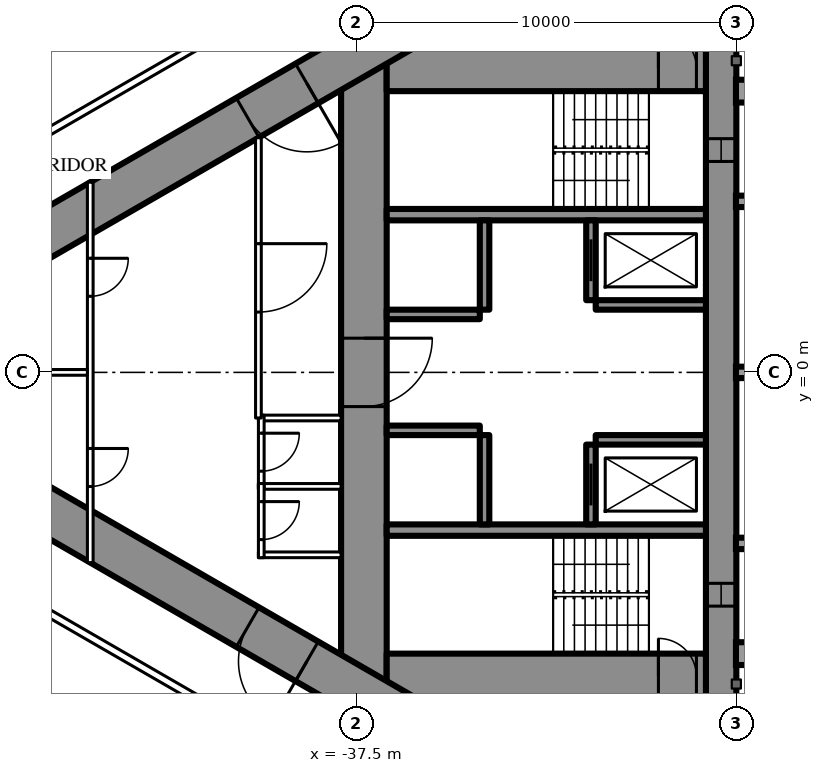
"""IFC4 building model, lengths in metres.
Left out: names, types, materials, properties, quantities, classifications, styles, units other than length and angle.
Written with IfcOpenShell. Run it as: python <this file> out.ifc"""

import sys

from ifc_helpers import new_model, si_unit, direction, frame, frame_2d, origin, place, context, subcontext, project, spatial, rectangle, extrude, element, fill, save


model = new_model("IFC4")
c1 = context("Model", 3, precision=1e-05, world=origin(), true_north=direction((0.0, 1.0)))
c2 = subcontext(c1, "Body", "Model", "MODEL_VIEW")
j1 = project(units=[si_unit("LENGTHUNIT", "METRE"), si_unit("PLANEANGLEUNIT", "RADIAN")], contexts=[c1])
p1 = place(None, origin())
s1 = spatial("IfcSite", under=j1, at=p1, CompositionType="ELEMENT")
p2 = place(p1, origin())
s2 = spatial("IfcBuilding", under=s1, at=p2, CompositionType="ELEMENT")
p3 = place(p2, frame((0.0, 0.0, 115.1)))
s3 = spatial("IfcBuildingStorey", under=s2, at=p3, CompositionType="ELEMENT", Elevation=115.1)
p4 = place(p3, frame((-27.9, 8.6, 0.0), z_axis=(0.0, 0.0, 1.0), x_axis=(0.0, -1.0, 0.0)))
e1 = element("IfcWall", 1, at=p4, inside=s3, PredefinedType="SHEAR", context=c2, shape_type="SweptSolid", body=[
    extrude(rectangle(XDim=17.2, YDim=0.8, at=frame_2d((8.6, 0.0))), origin(), (0.0, 0.0, 1.0), 3.5),
])
p5 = place(p4, frame((2.45, 0.0, 0.6)))
e2 = element("IfcOpeningElement", 2, at=p5, cuts=e1, PredefinedType="OPENING", context=c2, shape_type="SweptSolid", body=[
    extrude(rectangle(XDim=0.6, YDim=2.1, at=frame_2d((0.3, 1.05))), frame((0.0, 0.41, 0.0), z_axis=(0.0, -1.0, 0.0), x_axis=(1.0, 0.0, 0.0)), (0.0, 0.0, 1.0), 0.82),
])
p6 = place(p4, frame((14.15, 0.0, 0.6)))
e3 = element("IfcOpeningElement", 3, at=p6, cuts=e1, PredefinedType="OPENING", context=c2, shape_type="SweptSolid", body=[
    extrude(rectangle(XDim=0.6, YDim=2.1, at=frame_2d((0.3, 1.05))), frame((0.0, 0.41, 0.0), z_axis=(0.0, -1.0, 0.0), x_axis=(1.0, 0.0, 0.0)), (0.0, 0.0, 1.0), 0.82),
])
p7 = place(p3, frame((-37.3, 8.6, 0.0), z_axis=(0.0, 0.0, 1.0), x_axis=(0.0, -1.0, 0.0)))
e4 = element("IfcWall", 4, at=p7, inside=s3, PredefinedType="SHEAR", context=c2, shape_type="SweptSolid", body=[
    extrude(rectangle(XDim=17.2, YDim=1.2, at=frame_2d((8.6, 0.0))), origin(), (0.0, 0.0, 1.0), 3.5),
])
p8 = place(p7, frame((7.7, 0.0, 0.0)))
e5 = element("IfcOpeningElement", 5, at=p8, cuts=e4, PredefinedType="OPENING", context=c2, shape_type="SweptSolid", body=[
    extrude(rectangle(XDim=1.8, YDim=2.2, at=frame_2d((0.9, 1.1))), frame((0.0, 0.61, 0.0), z_axis=(0.0, -1.0, 0.0), x_axis=(1.0, 0.0, 0.0)), (0.0, 0.0, 1.0), 1.22),
])
p9 = place(p3, frame((-28.3, 8.0, 0.0), z_axis=(0.0, 0.0, 1.0), x_axis=(-1.0, 0.0, 0.0)))
e6 = element("IfcWall", 6, at=p9, inside=s3, PredefinedType="SHEAR", context=c2, shape_type="SweptSolid", body=[
    extrude(rectangle(XDim=8.4, YDim=1.2, at=frame_2d((4.2, 0.0))), origin(), (0.0, 0.0, 1.0), 3.5),
])
p10 = place(p9, frame((0.25, 0.0, 0.0)))
e7 = element("IfcOpeningElement", 7, at=p10, cuts=e6, PredefinedType="OPENING", context=c2, shape_type="SweptSolid", body=[
    extrude(rectangle(XDim=1.0, YDim=2.2, at=frame_2d((0.5, 1.1))), frame((0.0, 0.61, 0.0), z_axis=(0.0, -1.0, 0.0), x_axis=(1.0, 0.0, 0.0)), (0.0, 0.0, 1.0), 1.22),
])
p11 = place(p3, frame((-28.3, -8.0, 0.0), z_axis=(0.0, 0.0, 1.0), x_axis=(-1.0, 0.0, 0.0)))
e8 = element("IfcWall", 8, at=p11, inside=s3, PredefinedType="SHEAR", context=c2, shape_type="SweptSolid", body=[
    extrude(rectangle(XDim=8.4, YDim=1.2, at=frame_2d((4.2, 0.0))), origin(), (0.0, 0.0, 1.0), 3.5),
])
p12 = place(p11, frame((0.25, 0.0, 0.0)))
e9 = element("IfcOpeningElement", 9, at=p12, cuts=e8, PredefinedType="OPENING", context=c2, shape_type="SweptSolid", body=[
    extrude(rectangle(XDim=1.0, YDim=2.2, at=frame_2d((0.5, 1.1))), frame((0.0, 0.61, 0.0), z_axis=(0.0, -1.0, 0.0), x_axis=(1.0, 0.0, 0.0)), (0.0, 0.0, 1.0), 1.22),
])
for number, where, z_axis, x_axis in (
    (10, (-28.3, 4.15, 0.0), (0.0, 0.0, 1.0), (-1.0, 0.0, 0.0)),
    (11, (-28.3, -4.15, 0.0), (0.0, 0.0, 1.0), (-1.0, 0.0, 0.0)),
):
    element("IfcWall", number, at=place(p3, frame(where, z_axis=z_axis, x_axis=x_axis)), inside=s3, PredefinedType="SHEAR", context=c2, shape_type="SweptSolid", body=[
        extrude(rectangle(XDim=8.4, YDim=0.3, at=frame_2d((4.2, 0.0))), origin(), (0.0, 0.0, 1.0), 3.5),
    ])
p13 = place(p3, frame((-31.325, 4.0, 0.0), z_axis=(0.0, 0.0, 1.0), x_axis=(0.0, -1.0, 0.0)))
e12 = element("IfcWall", 12, at=p13, inside=s3, PredefinedType="SHEAR", context=c2, shape_type="SweptSolid", body=[
    extrude(rectangle(XDim=2.1, YDim=0.25, at=frame_2d((1.05, 0.0))), origin(), (0.0, 0.0, 1.0), 3.5),
])
p14 = place(p13, frame((0.5, 0.0, 0.0)))
e13 = element("IfcOpeningElement", 13, at=p14, cuts=e12, PredefinedType="OPENING", context=c2, shape_type="SweptSolid", body=[
    extrude(rectangle(XDim=1.1, YDim=2.2, at=frame_2d((0.55, 1.1))), frame((0.0, 0.135, 0.0), z_axis=(0.0, -1.0, 0.0), x_axis=(1.0, 0.0, 0.0)), (0.0, 0.0, 1.0), 0.27),
])
p15 = place(p3, frame((-34.125, 4.0, 0.0), z_axis=(0.0, 0.0, 1.0), x_axis=(0.0, -1.0, 0.0)))
e14 = element("IfcWall", 14, at=p15, inside=s3, PredefinedType="SHEAR", context=c2, shape_type="SweptSolid", body=[
    extrude(rectangle(XDim=2.35, YDim=0.25, at=frame_2d((1.175, 0.0))), origin(), (0.0, 0.0, 1.0), 3.5),
])
p16 = place(p3, frame((-28.3, 1.775, 0.0), z_axis=(0.0, 0.0, 1.0), x_axis=(-1.0, 0.0, 0.0)))
e15 = element("IfcWall", 15, at=p16, inside=s3, PredefinedType="SHEAR", context=c2, shape_type="SweptSolid", body=[
    extrude(rectangle(XDim=2.9, YDim=0.25, at=frame_2d((1.45, 0.0))), origin(), (0.0, 0.0, 1.0), 3.5),
])
p17 = place(p3, frame((-34.25, 1.525, 0.0), z_axis=(0.0, 0.0, 1.0), x_axis=(-1.0, 0.0, 0.0)))
e16 = element("IfcWall", 16, at=p17, inside=s3, PredefinedType="SHEAR", context=c2, shape_type="SweptSolid", body=[
    extrude(rectangle(XDim=2.45, YDim=0.25, at=frame_2d((1.225, 0.0))), origin(), (0.0, 0.0, 1.0), 3.5),
])
p18 = place(p3, frame((-31.325, -1.9, 0.0), z_axis=(0.0, 0.0, 1.0), x_axis=(0.0, -1.0, 0.0)))
e17 = element("IfcWall", 17, at=p18, inside=s3, PredefinedType="SHEAR", context=c2, shape_type="SweptSolid", body=[
    extrude(rectangle(XDim=2.1, YDim=0.25, at=frame_2d((1.05, 0.0))), origin(), (0.0, 0.0, 1.0), 3.5),
])
p19 = place(p18, frame((0.5, 0.0, 0.0)))
e18 = element("IfcOpeningElement", 18, at=p19, cuts=e17, PredefinedType="OPENING", context=c2, shape_type="SweptSolid", body=[
    extrude(rectangle(XDim=1.1, YDim=2.2, at=frame_2d((0.55, 1.1))), frame((0.0, 0.135, 0.0), z_axis=(0.0, -1.0, 0.0), x_axis=(1.0, 0.0, 0.0)), (0.0, 0.0, 1.0), 0.27),
])
p20 = place(p3, frame((-34.125, -1.65, 0.0), z_axis=(0.0, 0.0, 1.0), x_axis=(0.0, -1.0, 0.0)))
e19 = element("IfcWall", 19, at=p20, inside=s3, PredefinedType="SHEAR", context=c2, shape_type="SweptSolid", body=[
    extrude(rectangle(XDim=2.35, YDim=0.25, at=frame_2d((1.175, 0.0))), origin(), (0.0, 0.0, 1.0), 3.5),
])
p21 = place(p3, frame((-28.3, -1.775, 0.0), z_axis=(0.0, 0.0, 1.0), x_axis=(-1.0, 0.0, 0.0)))
e20 = element("IfcWall", 20, at=p21, inside=s3, PredefinedType="SHEAR", context=c2, shape_type="SweptSolid", body=[
    extrude(rectangle(XDim=2.9, YDim=0.25, at=frame_2d((1.45, 0.0))), origin(), (0.0, 0.0, 1.0), 3.5),
])
p22 = place(p3, frame((-34.25, -1.525, 0.0), z_axis=(0.0, 0.0, 1.0), x_axis=(-1.0, 0.0, 0.0)))
e21 = element("IfcWall", 21, at=p22, inside=s3, PredefinedType="SHEAR", context=c2, shape_type="SweptSolid", body=[
    extrude(rectangle(XDim=2.45, YDim=0.25, at=frame_2d((1.225, 0.0))), origin(), (0.0, 0.0, 1.0), 3.5),
])
p23 = place(p3, frame((-27.2, 14.3, 0.0), z_axis=(0.0, 0.0, 1.0), x_axis=(-0.866026593062, -0.499997940104, 0.0)))
e22 = element("IfcWall", 22, at=p23, inside=s3, PredefinedType="SHEAR", context=c2, shape_type="SweptSolid", body=[
    extrude(rectangle(XDim=28.946, YDim=1.2, at=frame_2d((14.473, 0.0))), origin(), (0.0, 0.0, 1.0), 3.5),
])
p24 = place(p23, frame((4.6, 0.0, 0.0)))
e23 = element("IfcOpeningElement", 23, at=p24, cuts=e22, PredefinedType="OPENING", context=c2, shape_type="SweptSolid", body=[
    extrude(rectangle(XDim=1.0, YDim=2.2, at=frame_2d((0.5, 1.1))), frame((0.0, 0.61, 0.0), z_axis=(0.0, -1.0, 0.0), x_axis=(1.0, 0.0, 0.0)), (0.0, 0.0, 1.0), 1.22),
])
p25 = place(p23, frame((13.395, 0.0, 0.0)))
e24 = element("IfcOpeningElement", 24, at=p25, cuts=e22, PredefinedType="OPENING", context=c2, shape_type="SweptSolid", body=[
    extrude(rectangle(XDim=1.8, YDim=2.2, at=frame_2d((0.9, 1.1))), frame((0.0, 0.61, 0.0), z_axis=(0.0, -1.0, 0.0), x_axis=(1.0, 0.0, 0.0)), (0.0, 0.0, 1.0), 1.22),
])
p26 = place(p3, frame((-27.2, -14.3, 0.0), z_axis=(0.0, 0.0, 1.0), x_axis=(-0.866024021859, 0.500002393557, 0.0)))
e25 = element("IfcWall", 25, at=p26, inside=s3, PredefinedType="SHEAR", context=c2, shape_type="SweptSolid", body=[
    extrude(rectangle(XDim=27.907, YDim=1.2, at=frame_2d((13.954, 0.0))), origin(), (0.0, 0.0, 1.0), 3.5),
])
p27 = place(p26, frame((4.6, 0.0, 0.0)))
e26 = element("IfcOpeningElement", 26, at=p27, cuts=e25, PredefinedType="OPENING", context=c2, shape_type="SweptSolid", body=[
    extrude(rectangle(XDim=1.0, YDim=2.2, at=frame_2d((0.5, 1.1))), frame((0.0, 0.61, 0.0), z_axis=(0.0, -1.0, 0.0), x_axis=(1.0, 0.0, 0.0)), (0.0, 0.0, 1.0), 1.22),
])
p28 = place(p26, frame((13.395, 0.0, 0.0)))
e27 = element("IfcOpeningElement", 27, at=p28, cuts=e25, PredefinedType="OPENING", context=c2, shape_type="SweptSolid", body=[
    extrude(rectangle(XDim=1.8, YDim=2.2, at=frame_2d((0.9, 1.1))), frame((0.0, 0.61, 0.0), z_axis=(0.0, -1.0, 0.0), x_axis=(1.0, 0.0, 0.0)), (0.0, 0.0, 1.0), 1.22),
])
p29 = place(p3, frame((-37.7, 10.894, 0.0), z_axis=(0.0, 0.0, 1.0), x_axis=(-0.866027905338, -0.499995667157, 0.0)))
e28 = element("IfcWall", 28, at=p29, inside=s3, PredefinedType="PARTITIONING", context=c2, shape_type="SweptSolid", body=[
    extrude(rectangle(XDim=21.787, YDim=0.2, at=frame_2d((10.894, 0.0))), origin(), (0.0, 0.0, 1.0), 3.25),
])
p30 = place(p29, frame((11.23, 0.0, 0.0)))
e29 = element("IfcOpeningElement", 29, at=p30, cuts=e28, PredefinedType="OPENING", context=c2, shape_type="SweptSolid", body=[
    extrude(rectangle(XDim=0.95, YDim=2.2, at=frame_2d((0.475, 1.1))), frame((0.0, 0.11, 0.0), z_axis=(0.0, -1.0, 0.0), x_axis=(1.0, 0.0, 0.0)), (0.0, 0.0, 1.0), 0.22),
])
p31 = place(p29, frame((9.531, 0.0, 0.0)))
e30 = element("IfcOpeningElement", 30, at=p31, cuts=e28, PredefinedType="OPENING", context=c2, shape_type="SweptSolid", body=[
    extrude(rectangle(XDim=0.95, YDim=2.2, at=frame_2d((0.475, 1.1))), frame((0.0, 0.11, 0.0), z_axis=(0.0, -1.0, 0.0), x_axis=(1.0, 0.0, 0.0)), (0.0, 0.0, 1.0), 0.22),
])
p32 = place(p3, frame((-36.92, -11.344, 0.0), z_axis=(0.0, 0.0, 1.0), x_axis=(-0.866027897759, 0.499995680284, 0.0)))
e31 = element("IfcWall", 31, at=p32, inside=s3, PredefinedType="PARTITIONING", context=c2, shape_type="SweptSolid", body=[
    extrude(rectangle(XDim=11.731, YDim=0.2, at=frame_2d((5.865, 0.0))), origin(), (0.0, 0.0, 1.0), 3.25),
])
p33 = place(p32, frame((3.35, 0.0, 0.0)))
e32 = element("IfcOpeningElement", 32, at=p33, cuts=e31, PredefinedType="OPENING", context=c2, shape_type="SweptSolid", body=[
    extrude(rectangle(XDim=1.0, YDim=2.2, at=frame_2d((0.5, 1.1))), frame((0.0, 0.11, 0.0), z_axis=(0.0, -1.0, 0.0), x_axis=(1.0, 0.0, 0.0)), (0.0, 0.0, 1.0), 0.22),
])
for number, where, z_axis, x_axis in (
    (33, (-37.9, -1.2, 0.0), (0.0, 0.0, 1.0), (-1.0, 0.0, 0.0)),
    (34, (-37.9, -3.0, 0.0), (0.0, 0.0, 1.0), (-1.0, 0.0, 0.0)),
    (35, (-37.9, -4.8, 0.0), (0.0, 0.0, 1.0), (-1.0, 0.0, 0.0)),
):
    element("IfcWall", number, at=place(p3, frame(where, z_axis=z_axis, x_axis=x_axis)), inside=s3, PredefinedType="PARTITIONING", context=c2, shape_type="SweptSolid", body=[
        extrude(rectangle(XDim=2.175, YDim=0.15, at=frame_2d((1.087, 0.0))), origin(), (0.0, 0.0, 1.0), 3.25),
    ])
p34 = place(p3, frame((-40.0, -1.125, 0.0), z_axis=(0.0, 0.0, 1.0), x_axis=(0.0, -1.0, 0.0)))
e36 = element("IfcWall", 36, at=p34, inside=s3, PredefinedType="PARTITIONING", context=c2, shape_type="SweptSolid", body=[
    extrude(rectangle(XDim=1.95, YDim=0.15, at=frame_2d((0.975, 0.0))), origin(), (0.0, 0.0, 1.0), 3.25),
])
p35 = place(p34, frame((0.475, 0.0, 0.0)))
e37 = element("IfcOpeningElement", 37, at=p35, cuts=e36, PredefinedType="OPENING", context=c2, shape_type="SweptSolid", body=[
    extrude(rectangle(XDim=1.0, YDim=2.2, at=frame_2d((0.5, 1.1))), frame((0.0, 0.085, 0.0), z_axis=(0.0, -1.0, 0.0), x_axis=(1.0, 0.0, 0.0)), (0.0, 0.0, 1.0), 0.17),
])
p36 = place(p3, frame((-40.0, -2.925, 0.0), z_axis=(0.0, 0.0, 1.0), x_axis=(0.0, -1.0, 0.0)))
e38 = element("IfcWall", 38, at=p36, inside=s3, PredefinedType="PARTITIONING", context=c2, shape_type="SweptSolid", body=[
    extrude(rectangle(XDim=1.95, YDim=0.15, at=frame_2d((0.975, 0.0))), origin(), (0.0, 0.0, 1.0), 3.25),
])
p37 = place(p36, frame((0.475, 0.0, 0.0)))
e39 = element("IfcOpeningElement", 39, at=p37, cuts=e38, PredefinedType="OPENING", context=c2, shape_type="SweptSolid", body=[
    extrude(rectangle(XDim=1.0, YDim=2.2, at=frame_2d((0.5, 1.1))), frame((0.0, 0.085, 0.0), z_axis=(0.0, -1.0, 0.0), x_axis=(1.0, 0.0, 0.0)), (0.0, 0.0, 1.0), 0.17),
])
p38 = place(p3, frame((-40.075, 6.174, 0.0), z_axis=(0.0, 0.0, 1.0), x_axis=(0.0, -1.0, 0.0)))
e40 = element("IfcWall", 40, at=p38, inside=s3, PredefinedType="PARTITIONING", context=c2, shape_type="SweptSolid", body=[
    extrude(rectangle(XDim=7.374, YDim=0.15, at=frame_2d((3.687, 0.0))), origin(), (0.0, 0.0, 1.0), 3.25),
])
p39 = place(p38, frame((2.787, 0.0, 0.0)))
e41 = element("IfcOpeningElement", 41, at=p39, cuts=e40, PredefinedType="OPENING", context=c2, shape_type="SweptSolid", body=[
    extrude(rectangle(XDim=1.8, YDim=2.2, at=frame_2d((0.9, 1.1))), frame((0.0, 0.085, 0.0), z_axis=(0.0, -1.0, 0.0), x_axis=(1.0, 0.0, 0.0)), (0.0, 0.0, 1.0), 0.17),
])
p40 = place(p3, frame((-44.5, 5.005, 0.0), z_axis=(0.0, 0.0, 1.0), x_axis=(0.0, -1.0, 0.0)))
e42 = element("IfcWall", 42, at=p40, inside=s3, PredefinedType="PARTITIONING", context=c2, shape_type="SweptSolid", body=[
    extrude(rectangle(XDim=10.009, YDim=0.15, at=frame_2d((5.005, 0.0))), origin(), (0.0, 0.0, 1.0), 2.45),
])
p41 = place(p40, frame((2.002, 0.0, 0.0)))
e43 = element("IfcOpeningElement", 43, at=p41, cuts=e42, PredefinedType="OPENING", context=c2, shape_type="SweptSolid", body=[
    extrude(rectangle(XDim=1.0, YDim=2.2, at=frame_2d((0.5, 1.1))), frame((0.0, 0.085, 0.0), z_axis=(0.0, -1.0, 0.0), x_axis=(1.0, 0.0, 0.0)), (0.0, 0.0, 1.0), 0.17),
])
p42 = place(p40, frame((7.007, 0.0, 0.0)))
e44 = element("IfcOpeningElement", 44, at=p42, cuts=e42, PredefinedType="OPENING", context=c2, shape_type="SweptSolid", body=[
    extrude(rectangle(XDim=1.0, YDim=2.2, at=frame_2d((0.5, 1.1))), frame((0.0, 0.085, 0.0), z_axis=(0.0, -1.0, 0.0), x_axis=(1.0, 0.0, 0.0)), (0.0, 0.0, 1.0), 0.17),
])
p43 = place(p3, frame((-44.575, 0.0, 0.0), z_axis=(0.0, 0.0, 1.0), x_axis=(-1.0, 0.0, 0.0)))
e45 = element("IfcWall", 45, at=p43, inside=s3, PredefinedType="PARTITIONING", context=c2, shape_type="SweptSolid", body=[
    extrude(rectangle(XDim=8.593, YDim=0.15, at=frame_2d((4.297, 0.0))), origin(), (0.0, 0.0, 1.0), 2.2),
])
p44 = place(p35, origin())
e46 = element("IfcDoor", 46, at=p44, inside=s3, OperationType="SINGLE_SWING_LEFT", PredefinedType="DOOR", context=c2, shape_type="SweptSolid", body=[
    extrude(rectangle(XDim=1.0, YDim=2.2, at=frame_2d((0.5, 1.1))), frame((0.0, 0.025, 0.0), z_axis=(0.0, -1.0, 0.0), x_axis=(1.0, 0.0, 0.0)), (0.0, 0.0, 1.0), 0.05),
])
fill(e37, e46)
p45 = place(p37, origin())
e47 = element("IfcDoor", 47, at=p45, inside=s3, OperationType="SINGLE_SWING_LEFT", PredefinedType="DOOR", context=c2, shape_type="SweptSolid", body=[
    extrude(rectangle(XDim=1.0, YDim=2.2, at=frame_2d((0.5, 1.1))), frame((0.0, 0.025, 0.0), z_axis=(0.0, -1.0, 0.0), x_axis=(1.0, 0.0, 0.0)), (0.0, 0.0, 1.0), 0.05),
])
fill(e39, e47)
p46 = place(p39, origin())
e48 = element("IfcDoor", 48, at=p46, inside=s3, OperationType="DOUBLE_DOOR_SINGLE_SWING", PredefinedType="DOOR", context=c2, shape_type="SweptSolid", body=[
    extrude(rectangle(XDim=1.8, YDim=2.2, at=frame_2d((0.9, 1.1))), frame((0.0, 0.025, 0.0), z_axis=(0.0, -1.0, 0.0), x_axis=(1.0, 0.0, 0.0)), (0.0, 0.0, 1.0), 0.05),
])
fill(e41, e48)
p47 = place(p41, origin())
e49 = element("IfcDoor", 49, at=p47, inside=s3, OperationType="SINGLE_SWING_LEFT", PredefinedType="DOOR", context=c2, shape_type="SweptSolid", body=[
    extrude(rectangle(XDim=1.0, YDim=2.2, at=frame_2d((0.5, 1.1))), frame((0.0, 0.025, 0.0), z_axis=(0.0, -1.0, 0.0), x_axis=(1.0, 0.0, 0.0)), (0.0, 0.0, 1.0), 0.05),
])
fill(e43, e49)
p48 = place(p42, origin())
e50 = element("IfcDoor", 50, at=p48, inside=s3, OperationType="SINGLE_SWING_LEFT", PredefinedType="DOOR", context=c2, shape_type="SweptSolid", body=[
    extrude(rectangle(XDim=1.0, YDim=2.2, at=frame_2d((0.5, 1.1))), frame((0.0, 0.025, 0.0), z_axis=(0.0, -1.0, 0.0), x_axis=(1.0, 0.0, 0.0)), (0.0, 0.0, 1.0), 0.05),
])
fill(e44, e50)
p49 = place(p25, origin())
e51 = element("IfcDoor", 51, at=p49, inside=s3, OperationType="DOUBLE_DOOR_SINGLE_SWING", PredefinedType="DOOR", context=c2, shape_type="SweptSolid", body=[
    extrude(rectangle(XDim=1.8, YDim=2.2, at=frame_2d((0.9, 1.1))), frame((0.0, 0.025, 0.0), z_axis=(0.0, -1.0, 0.0), x_axis=(1.0, 0.0, 0.0)), (0.0, 0.0, 1.0), 0.05),
])
fill(e24, e51)
p50 = place(p28, origin())
e52 = element("IfcDoor", 52, at=p50, inside=s3, OperationType="DOUBLE_DOOR_SINGLE_SWING", PredefinedType="DOOR", context=c2, shape_type="SweptSolid", body=[
    extrude(rectangle(XDim=1.8, YDim=2.2, at=frame_2d((0.9, 1.1))), frame((0.0, 0.025, 0.0), z_axis=(0.0, -1.0, 0.0), x_axis=(1.0, 0.0, 0.0)), (0.0, 0.0, 1.0), 0.05),
])
fill(e27, e52)
p51 = place(p8, origin())
e53 = element("IfcDoor", 53, at=p51, inside=s3, OperationType="DOUBLE_DOOR_SINGLE_SWING", PredefinedType="DOOR", context=c2, shape_type="SweptSolid", body=[
    extrude(rectangle(XDim=1.8, YDim=2.2, at=frame_2d((0.9, 1.1))), frame((0.0, 0.025, 0.0), z_axis=(0.0, -1.0, 0.0), x_axis=(1.0, 0.0, 0.0)), (0.0, 0.0, 1.0), 0.05),
])
fill(e5, e53)
p52 = place(p10, origin())
e54 = element("IfcDoor", 54, at=p52, inside=s3, OperationType="SINGLE_SWING_RIGHT", PredefinedType="DOOR", context=c2, shape_type="SweptSolid", body=[
    extrude(rectangle(XDim=1.0, YDim=2.2, at=frame_2d((0.5, 1.1))), frame((0.0, 0.025, 0.0), z_axis=(0.0, -1.0, 0.0), x_axis=(1.0, 0.0, 0.0)), (0.0, 0.0, 1.0), 0.05),
])
fill(e7, e54)
p53 = place(p12, origin())
e55 = element("IfcDoor", 55, at=p53, inside=s3, OperationType="SINGLE_SWING_RIGHT", PredefinedType="DOOR", context=c2, shape_type="SweptSolid", body=[
    extrude(rectangle(XDim=1.0, YDim=2.2, at=frame_2d((0.5, 1.1))), frame((0.0, 0.025, 0.0), z_axis=(0.0, -1.0, 0.0), x_axis=(1.0, 0.0, 0.0)), (0.0, 0.0, 1.0), 0.05),
])
fill(e9, e55)
p54 = place(p14, origin())
e56 = element("IfcDoor", 56, at=p54, inside=s3, OperationType="SLIDING_TO_LEFT", PredefinedType="USERDEFINED", context=c2, shape_type="SweptSolid", body=[
    extrude(rectangle(XDim=1.1, YDim=2.2, at=frame_2d((0.55, 1.1))), frame((0.0, 0.025, 0.0), z_axis=(0.0, -1.0, 0.0), x_axis=(1.0, 0.0, 0.0)), (0.0, 0.0, 1.0), 0.05),
])
fill(e13, e56)
p55 = place(p19, origin())
e57 = element("IfcDoor", 57, at=p55, inside=s3, OperationType="SLIDING_TO_LEFT", PredefinedType="USERDEFINED", context=c2, shape_type="SweptSolid", body=[
    extrude(rectangle(XDim=1.1, YDim=2.2, at=frame_2d((0.55, 1.1))), frame((0.0, 0.025, 0.0), z_axis=(0.0, -1.0, 0.0), x_axis=(1.0, 0.0, 0.0)), (0.0, 0.0, 1.0), 0.05),
])
fill(e18, e57)
p56 = place(p5, origin())
e58 = element("IfcWindow", 58, at=p56, inside=s3, PartitioningType="SINGLE_PANEL", PredefinedType="WINDOW", context=c2, shape_type="SweptSolid", body=[
    extrude(rectangle(XDim=0.6, YDim=2.1, at=frame_2d((0.3, 1.05))), frame((0.0, 0.03, 0.0), z_axis=(0.0, -1.0, 0.0), x_axis=(1.0, 0.0, 0.0)), (0.0, 0.0, 1.0), 0.06),
])
fill(e2, e58)
p57 = place(p6, origin())
e59 = element("IfcWindow", 59, at=p57, inside=s3, PartitioningType="SINGLE_PANEL", PredefinedType="WINDOW", context=c2, shape_type="SweptSolid", body=[
    extrude(rectangle(XDim=0.6, YDim=2.1, at=frame_2d((0.3, 1.05))), frame((0.0, 0.03, 0.0), z_axis=(0.0, -1.0, 0.0), x_axis=(1.0, 0.0, 0.0)), (0.0, 0.0, 1.0), 0.06),
])
fill(e3, e59)
save(model, sys.argv[1])
